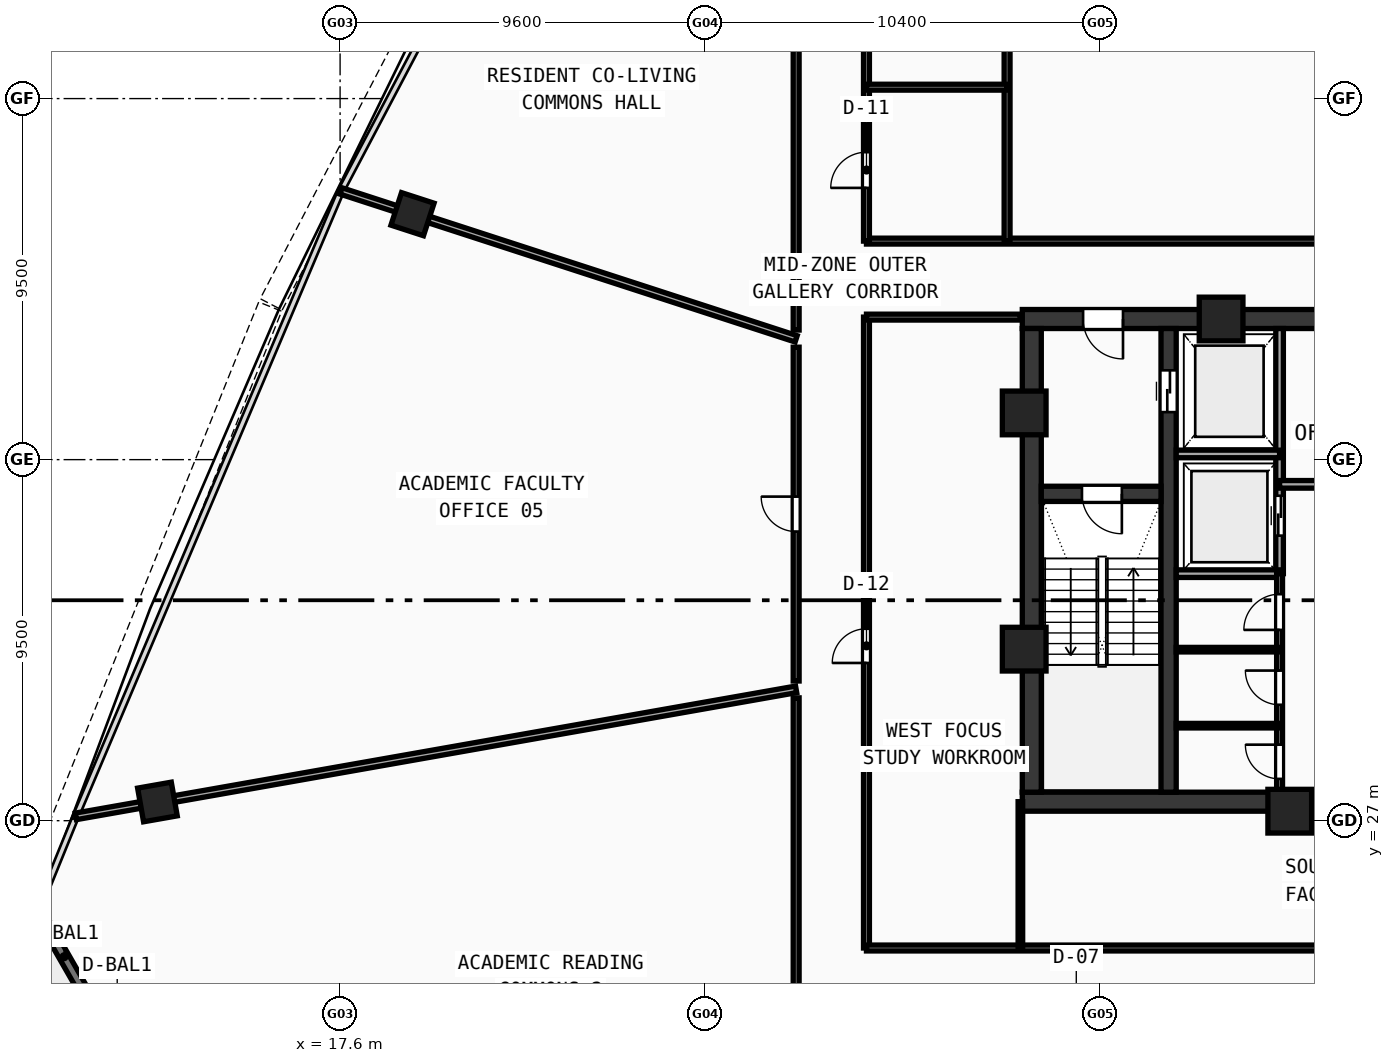
"""IFC4 building model, lengths in metres.
Left out: names, types, materials, properties, quantities, classifications, styles, units other than length and angle.
Written with IfcOpenShell. Run it as: python <this file> out.ifc"""

import sys

from ifc_helpers import new_model, si_unit, direction, frame, frame_2d, origin, origin_with_axes, origin_2d, place, context, subcontext, project, spatial, rectangle, hollow_rectangle, extrude, source, transform, mapped, element, fill, save


model = new_model("IFC4")
c1 = context("Model", 3, precision=1e-05, world=origin(), true_north=direction((0.0, 1.0)))
c2 = subcontext(c1, "Body", "Model", "MODEL_VIEW")
j1 = project(units=[si_unit("LENGTHUNIT", "METRE"), si_unit("PLANEANGLEUNIT", "RADIAN")], contexts=[c1])
p1 = place(None, origin())
s1 = spatial("IfcSite", under=j1, at=p1, CompositionType="ELEMENT")
p2 = place(p1, origin())
s2 = spatial("IfcBuilding", under=s1, at=p2, CompositionType="ELEMENT")
p3 = place(p2, frame((0.0, 0.0, 196.16)))
s3 = spatial("IfcBuildingStorey", under=s2, at=p3, CompositionType="ELEMENT", Elevation=196.16)
p4 = place(p3, frame((35.55, 27.5, 0.0), z_axis=(0.0, 0.0, 1.0), x_axis=(1.0, 0.0, 0.0)))
e1 = element("IfcWall", 1, at=p4, inside=s3, PredefinedType="SHEAR", context=c2, shape_type="SweptSolid", body=[
    extrude(rectangle(XDim=24.9, YDim=0.5, at=frame_2d((12.45, 0.0))), origin(), (0.0, 0.0, 1.0), 3.54),
])
p5 = place(p3, frame((35.55, 40.2, 0.0), z_axis=(0.0, 0.0, 1.0), x_axis=(1.0, 0.0, 0.0)))
e2 = element("IfcWall", 2, at=p5, inside=s3, PredefinedType="SHEAR", context=c2, shape_type="SweptSolid", body=[
    extrude(rectangle(XDim=11.25, YDim=0.5, at=frame_2d((5.625, 0.0))), origin(), (0.0, 0.0, 1.0), 3.54),
])
p6 = place(p5, frame((1.6, 0.0, 0.0)))
e3 = element("IfcOpeningElement", 3, at=p6, cuts=e2, PredefinedType="OPENING", context=c2, shape_type="SweptSolid", body=[
    extrude(rectangle(XDim=1.05, YDim=2.1, at=frame_2d((0.525, 1.05))), frame((0.0, 0.26, 0.0), z_axis=(0.0, -1.0, 0.0), x_axis=(1.0, 0.0, 0.0)), (0.0, 0.0, 1.0), 0.52),
])
p7 = place(p3, frame((35.8, 27.75, 0.0), z_axis=(0.0, 0.0, 1.0), x_axis=(0.0, 1.0, 0.0)))
e4 = element("IfcWall", 4, at=p7, inside=s3, PredefinedType="SHEAR", context=c2, shape_type="SweptSolid", body=[
    extrude(rectangle(XDim=12.2, YDim=0.5, at=frame_2d((6.1, 0.0))), origin(), (0.0, 0.0, 1.0), 3.54),
])
p8 = place(p3, frame((39.4, 27.75, 0.0), z_axis=(0.0, 0.0, 1.0), x_axis=(0.0, 1.0, 0.0)))
e5 = element("IfcWall", 5, at=p8, inside=s3, PredefinedType="SHEAR", context=c2, shape_type="SweptSolid", body=[
    extrude(rectangle(XDim=12.2, YDim=0.4, at=frame_2d((6.1, 0.0))), origin(), (0.0, 0.0, 1.0), 3.54),
])
p9 = place(p8, frame((10.0, 0.0, 0.0)))
e6 = element("IfcOpeningElement", 6, at=p9, cuts=e5, PredefinedType="OPENING", context=c2, shape_type="SweptSolid", body=[
    extrude(rectangle(XDim=1.1, YDim=2.1, at=frame_2d((0.55, 1.05))), frame((0.0, 0.21, 0.0), z_axis=(0.0, -1.0, 0.0), x_axis=(1.0, 0.0, 0.0)), (0.0, 0.0, 1.0), 0.42),
])
p10 = place(p3, frame((36.05, 35.6, 0.0), z_axis=(0.0, 0.0, 1.0), x_axis=(1.0, 0.0, 0.0)))
e7 = element("IfcWall", 7, at=p10, inside=s3, PredefinedType="SHEAR", context=c2, shape_type="SweptSolid", body=[
    extrude(rectangle(XDim=3.15, YDim=0.4, at=frame_2d((1.575, 0.0))), origin(), (0.0, 0.0, 1.0), 3.54),
])
p11 = place(p10, frame((1.07, 0.0, 0.0)))
e8 = element("IfcOpeningElement", 8, at=p11, cuts=e7, PredefinedType="OPENING", context=c2, shape_type="SweptSolid", body=[
    extrude(rectangle(XDim=1.05, YDim=2.1, at=frame_2d((0.525, 1.05))), frame((0.0, 0.21, 0.0), z_axis=(0.0, -1.0, 0.0), x_axis=(1.0, 0.0, 0.0)), (0.0, 0.0, 1.0), 0.42),
])
m1 = source(origin(), c2, "Body", "SweptSolid", [
    extrude(hollow_rectangle(XDim=1.15, YDim=1.15, WallThickness=0.048, at=origin_2d()), origin(), (0.0, 0.0, 1.0), 3.8),
])
for number, where, z_axis, x_axis in (
    (9, (42.588, 27.25, -0.26), (0.0, 0.0, 1.0), (1.0, 0.0, 0.0)),
    (10, (40.781, 40.2, -0.26), (0.0, 0.0, 1.0), (1.0, 0.0, 0.0)),
    (11, (35.6, 37.729, -0.26), (0.0, 0.0, 1.0), (1.0, 0.0, 0.0)),
    (12, (35.6, 31.513, -0.26), (0.0, 0.0, 1.0), (1.0, 0.0, 0.0)),
):
    element("IfcColumn", number, at=place(p3, frame(where, z_axis=z_axis, x_axis=x_axis)), inside=s3, PredefinedType="COLUMN", context=c2, shape_type="MappedRepresentation", body=[
        mapped(m1, transform((0.0, 0.0, 0.0), scale=1.0)),
    ])
m2 = source(origin(), c2, "Body", "SweptSolid", [
    extrude(hollow_rectangle(XDim=0.9, YDim=0.9, WallThickness=0.036, at=origin_2d()), origin(), (0.0, 0.0, 1.0), 3.8),
])
for number, where, z_axis, x_axis in (
    (13, (19.505, 42.958, -0.26), (0.0, 0.0, 1.0), (-0.309, -0.951, 0.0)),
    (14, (12.793, 27.492, -0.26), (0.0, 0.0, 1.0), (0.174, -0.985, 0.0)),
):
    element("IfcColumn", number, at=place(p3, frame(where, z_axis=z_axis, x_axis=x_axis)), inside=s3, PredefinedType="COLUMN", context=c2, shape_type="MappedRepresentation", body=[
        mapped(m2, transform((0.0, 0.0, 0.0), scale=1.0)),
    ])
p12 = place(p3, frame((9.611, 24.686, 0.0), z_axis=(0.0, 0.0, 1.0), x_axis=(0.497930869929, -0.867216725376, 0.0)))
e15 = element("IfcWall", 15, at=p12, inside=s3, PredefinedType="STANDARD", context=c2, shape_type="SweptSolid", body=[
    extrude(rectangle(XDim=8.534, YDim=0.26, at=frame_2d((4.267, 0.0))), origin(), (0.0, 0.0, 1.0), 3.54),
])
p13 = place(p12, frame((3.367, 0.0, 0.0)))
e16 = element("IfcOpeningElement", 16, at=p13, cuts=e15, PredefinedType="OPENING", context=c2, shape_type="SweptSolid", body=[
    extrude(rectangle(XDim=1.8, YDim=2.15, at=frame_2d((0.9, 1.075))), frame((0.0, 0.14, 0.0), z_axis=(0.0, -1.0, 0.0), x_axis=(1.0, 0.0, 0.0)), (0.0, 0.0, 1.0), 0.28),
])
p14 = place(p3, frame((42.32, 33.5, 0.0), z_axis=(0.0, 0.0, 1.0), x_axis=(0.0, 1.0, 0.0)))
e17 = element("IfcWall", 17, at=p14, inside=s3, PredefinedType="SOLIDWALL", context=c2, shape_type="SweptSolid", body=[
    extrude(rectangle(XDim=6.45, YDim=0.2, at=frame_2d((3.225, 0.0))), origin(), (0.0, 0.0, 1.0), 3.54),
])
p15 = place(p14, frame((1.0, 0.0, 0.0)))
e18 = element("IfcOpeningElement", 18, at=p15, cuts=e17, PredefinedType="OPENING", context=c2, shape_type="SweptSolid", body=[
    extrude(rectangle(XDim=1.05, YDim=2.1, at=frame_2d((0.525, 1.05))), frame((0.0, 0.11, 0.0), z_axis=(0.0, -1.0, 0.0), x_axis=(1.0, 0.0, 0.0)), (0.0, 0.0, 1.0), 0.22),
])
for number, where, z_axis, x_axis in (
    (19, (39.6, 36.65, 0.0), (0.0, 0.0, 1.0), (1.0, 0.0, 0.0)),
    (20, (39.6, 33.5, 0.0), (0.0, 0.0, 1.0), (1.0, 0.0, 0.0)),
):
    element("IfcWall", number, at=place(p3, frame(where, z_axis=z_axis, x_axis=x_axis)), inside=s3, PredefinedType="SOLIDWALL", context=c2, shape_type="SweptSolid", body=[
        extrude(rectangle(XDim=2.72, YDim=0.2, at=frame_2d((1.36, 0.0))), origin(), (0.0, 0.0, 1.0), 3.54),
    ])
p16 = place(p3, frame((42.32, 35.85, 0.0), z_axis=(0.0, 0.0, 1.0), x_axis=(1.0, 0.0, 0.0)))
e21 = element("IfcWall", 21, at=p16, inside=s3, PredefinedType="SOLIDWALL", context=c2, shape_type="SweptSolid", body=[
    extrude(rectangle(XDim=4.73, YDim=0.2, at=frame_2d((2.365, 0.0))), origin(), (0.0, 0.0, 1.0), 3.54),
])
p17 = place(p16, frame((1.8, 0.0, 0.0)))
e22 = element("IfcOpeningElement", 22, at=p17, cuts=e21, PredefinedType="OPENING", context=c2, shape_type="SweptSolid", body=[
    extrude(rectangle(XDim=0.9, YDim=2.1, at=frame_2d((0.45, 1.05))), frame((0.0, 0.11, 0.0), z_axis=(0.0, -1.0, 0.0), x_axis=(1.0, 0.0, 0.0)), (0.0, 0.0, 1.0), 0.22),
])
p18 = place(p3, frame((42.32, 27.6, 0.0), z_axis=(0.0, 0.0, 1.0), x_axis=(0.0, 1.0, 0.0)))
e23 = element("IfcWall", 23, at=p18, inside=s3, PredefinedType="PARTITIONING", context=c2, shape_type="SweptSolid", body=[
    extrude(rectangle(XDim=5.9, YDim=0.155, at=frame_2d((2.95, 0.0))), origin(), (0.0, 0.0, 1.0), 3.54),
])
p19 = place(p18, frame((0.5, 0.0, 0.0)))
e24 = element("IfcOpeningElement", 24, at=p19, cuts=e23, PredefinedType="OPENING", context=c2, shape_type="SweptSolid", body=[
    extrude(rectangle(XDim=0.9, YDim=2.1, at=frame_2d((0.45, 1.05))), frame((0.0, 0.087, 0.0), z_axis=(0.0, -1.0, 0.0), x_axis=(1.0, 0.0, 0.0)), (0.0, 0.0, 1.0), 0.175),
])
p20 = place(p18, frame((2.45, 0.0, 0.0)))
e25 = element("IfcOpeningElement", 25, at=p20, cuts=e23, PredefinedType="OPENING", context=c2, shape_type="SweptSolid", body=[
    extrude(rectangle(XDim=0.9, YDim=2.1, at=frame_2d((0.45, 1.05))), frame((0.0, 0.087, 0.0), z_axis=(0.0, -1.0, 0.0), x_axis=(1.0, 0.0, 0.0)), (0.0, 0.0, 1.0), 0.175),
])
p21 = place(p18, frame((4.42, 0.0, 0.0)))
e26 = element("IfcOpeningElement", 26, at=p21, cuts=e23, PredefinedType="OPENING", context=c2, shape_type="SweptSolid", body=[
    extrude(rectangle(XDim=0.94, YDim=2.1, at=frame_2d((0.47, 1.05))), frame((0.0, 0.087, 0.0), z_axis=(0.0, -1.0, 0.0), x_axis=(1.0, 0.0, 0.0)), (0.0, 0.0, 1.0), 0.175),
])
for number, where, z_axis, x_axis in (
    (27, (39.6, 29.5, 0.0), (0.0, 0.0, 1.0), (1.0, 0.0, 0.0)),
    (28, (39.6, 31.5, 0.0), (0.0, 0.0, 1.0), (1.0, 0.0, 0.0)),
):
    element("IfcWall", number, at=place(p3, frame(where, z_axis=z_axis, x_axis=x_axis)), inside=s3, PredefinedType="PARTITIONING", context=c2, shape_type="SweptSolid", body=[
        extrude(rectangle(XDim=2.72, YDim=0.12, at=frame_2d((1.36, 0.0))), origin(), (0.0, 0.0, 1.0), 3.54),
    ])
p22 = place(p3, frame((31.45, 42.25, 0.0), z_axis=(0.0, 0.0, 1.0), x_axis=(1.0, 0.0, 0.0)))
e29 = element("IfcWall", 29, at=p22, inside=s3, PredefinedType="PARTITIONING", context=c2, shape_type="SweptSolid", body=[
    extrude(rectangle(XDim=33.1, YDim=0.155, at=frame_2d((16.55, 0.0))), origin(), (0.0, 0.0, 1.0), 2.89),
])
p23 = place(p3, frame((31.45, 42.25, 0.0), z_axis=(0.0, 0.0, 1.0), x_axis=(0.0, 1.0, 0.0)))
e30 = element("IfcWall", 30, at=p23, inside=s3, PredefinedType="PARTITIONING", context=c2, shape_type="SweptSolid", body=[
    extrude(rectangle(XDim=11.7, YDim=0.155, at=frame_2d((5.85, 0.0))), origin(), (0.0, 0.0, 1.0), 2.89),
])
p24 = place(p23, frame((1.4, 0.0, 0.0)))
e31 = element("IfcOpeningElement", 31, at=p24, cuts=e30, PredefinedType="OPENING", context=c2, shape_type="SweptSolid", body=[
    extrude(rectangle(XDim=0.94, YDim=2.1, at=frame_2d((0.47, 1.05))), frame((0.0, 0.087, 0.0), z_axis=(0.0, -1.0, 0.0), x_axis=(1.0, 0.0, 0.0)), (0.0, 0.0, 1.0), 0.175),
])
p25 = place(p23, frame((6.8, 0.0, 0.0)))
e32 = element("IfcOpeningElement", 32, at=p25, cuts=e30, PredefinedType="OPENING", context=c2, shape_type="SweptSolid", body=[
    extrude(rectangle(XDim=0.92, YDim=2.1, at=frame_2d((0.46, 1.05))), frame((0.0, 0.087, 0.0), z_axis=(0.0, -1.0, 0.0), x_axis=(1.0, 0.0, 0.0)), (0.0, 0.0, 1.0), 0.175),
])
p26 = place(p3, frame((35.15, 42.25, 0.0), z_axis=(0.0, 0.0, 1.0), x_axis=(0.0, 1.0, 0.0)))
e33 = element("IfcWall", 33, at=p26, inside=s3, PredefinedType="PARTITIONING", context=c2, shape_type="SweptSolid", body=[
    extrude(rectangle(XDim=11.7, YDim=0.155, at=frame_2d((5.85, 0.0))), origin(), (0.0, 0.0, 1.0), 2.89),
])
p27 = place(p3, frame((31.45, 46.3, 0.0), z_axis=(0.0, 0.0, 1.0), x_axis=(1.0, 0.0, 0.0)))
e34 = element("IfcWall", 34, at=p27, inside=s3, PredefinedType="PARTITIONING", context=c2, shape_type="SweptSolid", body=[
    extrude(rectangle(XDim=3.7, YDim=0.155, at=frame_2d((1.85, 0.0))), origin(), (0.0, 0.0, 1.0), 2.89),
])
p28 = place(p3, frame((31.45, 23.65, 0.0), z_axis=(0.0, 0.0, 1.0), x_axis=(0.0, 1.0, 0.0)))
e35 = element("IfcWall", 35, at=p28, inside=s3, PredefinedType="PARTITIONING", context=c2, shape_type="SweptSolid", body=[
    extrude(rectangle(XDim=16.6, YDim=0.155, at=frame_2d((8.3, 0.0))), origin(), (0.0, 0.0, 1.0), 2.89),
])
p29 = place(p28, frame((7.5, 0.0, 0.0)))
e36 = element("IfcOpeningElement", 36, at=p29, cuts=e35, PredefinedType="OPENING", context=c2, shape_type="SweptSolid", body=[
    extrude(rectangle(XDim=0.9, YDim=2.08, at=frame_2d((0.45, 1.04))), frame((0.0, 0.087, 0.0), z_axis=(0.0, -1.0, 0.0), x_axis=(1.0, 0.0, 0.0)), (0.0, 0.0, 1.0), 0.175),
])
p30 = place(p3, frame((31.45, 23.65, 0.0), z_axis=(0.0, 0.0, 1.0), x_axis=(1.0, 0.0, 0.0)))
e37 = element("IfcWall", 37, at=p30, inside=s3, PredefinedType="PARTITIONING", context=c2, shape_type="SweptSolid", body=[
    extrude(rectangle(XDim=33.1, YDim=0.155, at=frame_2d((16.55, 0.0))), origin(), (0.0, 0.0, 1.0), 2.89),
])
p31 = place(p30, frame((16.0, 0.0, 0.0)))
e38 = element("IfcOpeningElement", 38, at=p31, cuts=e37, PredefinedType="OPENING", context=c2, shape_type="SweptSolid", body=[
    extrude(rectangle(XDim=0.92, YDim=2.1, at=frame_2d((0.46, 1.05))), frame((0.0, 0.087, 0.0), z_axis=(0.0, -1.0, 0.0), x_axis=(1.0, 0.0, 0.0)), (0.0, 0.0, 1.0), 0.175),
])
p32 = place(p3, frame((31.45, 40.25, 0.0), z_axis=(0.0, 0.0, 1.0), x_axis=(1.0, 0.0, 0.0)))
e39 = element("IfcWall", 39, at=p32, inside=s3, PredefinedType="PARTITIONING", context=c2, shape_type="SweptSolid", body=[
    extrude(rectangle(XDim=4.05, YDim=0.155, at=frame_2d((2.025, 0.0))), origin(), (0.0, 0.0, 1.0), 3.54),
])
p33 = place(p3, frame((35.5, 23.65, 0.0), z_axis=(0.0, 0.0, 1.0), x_axis=(0.0, 1.0, 0.0)))
e40 = element("IfcWall", 40, at=p33, inside=s3, PredefinedType="PARTITIONING", context=c2, shape_type="SweptSolid", body=[
    extrude(rectangle(XDim=3.85, YDim=0.12, at=frame_2d((1.925, 0.0))), origin(), (0.0, 0.0, 1.0), 3.14),
])
p34 = place(p3, frame((29.6, 39.678, 0.0), z_axis=(0.0, 0.0, 1.0), x_axis=(-0.951056149915, 0.309018121975, 0.0)))
e41 = element("IfcWall", 41, at=p34, inside=s3, PredefinedType="PARTITIONING", context=c2, shape_type="SweptSolid", body=[
    extrude(rectangle(XDim=12.593, YDim=0.175, at=frame_2d((6.296, 0.0))), origin(), (0.0, 0.0, 1.0), 2.89),
])
p35 = place(p3, frame((29.6, 30.456, 0.0), z_axis=(0.0, 0.0, 1.0), x_axis=(-0.984807685374, -0.173648561263, 0.0)))
e42 = element("IfcWall", 42, at=p35, inside=s3, PredefinedType="PARTITIONING", context=c2, shape_type="SweptSolid", body=[
    extrude(rectangle(XDim=19.246, YDim=0.175, at=frame_2d((9.623, 0.0))), origin(), (0.0, 0.0, 1.0), 2.89),
])
p36 = place(p3, frame((29.6, 21.8, 0.0), z_axis=(0.0, 0.0, 1.0), x_axis=(0.0, 1.0, 0.0)))
e43 = element("IfcWall", 43, at=p36, inside=s3, PredefinedType="PARTITIONING", context=c2, shape_type="SweptSolid", body=[
    extrude(rectangle(XDim=8.432, YDim=0.155, at=frame_2d((4.216, 0.0))), origin(), (0.0, 0.0, 1.0), 3.14),
])
p37 = place(p3, frame((29.6, 30.675, 0.0), z_axis=(0.0, 0.0, 1.0), x_axis=(0.0, 1.0, 0.0)))
e44 = element("IfcWall", 44, at=p37, inside=s3, PredefinedType="PARTITIONING", context=c2, shape_type="SweptSolid", body=[
    extrude(rectangle(XDim=8.783, YDim=0.155, at=frame_2d((4.392, 0.0))), origin(), (0.0, 0.0, 1.0), 3.14),
])
p38 = place(p37, frame((3.932, 0.0, 0.0)))
e45 = element("IfcOpeningElement", 45, at=p38, cuts=e44, PredefinedType="OPENING", context=c2, shape_type="SweptSolid", body=[
    extrude(rectangle(XDim=0.92, YDim=2.1, at=frame_2d((0.46, 1.05))), frame((0.0, 0.087, 0.0), z_axis=(0.0, -1.0, 0.0), x_axis=(1.0, 0.0, 0.0)), (0.0, 0.0, 1.0), 0.175),
])
p39 = place(p3, frame((29.6, 39.91, 0.0), z_axis=(0.0, 0.0, 1.0), x_axis=(0.0, 1.0, 0.0)))
e46 = element("IfcWall", 46, at=p39, inside=s3, PredefinedType="PARTITIONING", context=c2, shape_type="SweptSolid", body=[
    extrude(rectangle(XDim=15.89, YDim=0.155, at=frame_2d((7.945, 0.0))), origin(), (0.0, 0.0, 1.0), 2.89),
])
p40 = place(p39, frame((7.584, 0.0, 0.0)))
e47 = element("IfcOpeningElement", 47, at=p40, cuts=e46, PredefinedType="OPENING", context=c2, shape_type="SweptSolid", body=[
    extrude(rectangle(XDim=0.96, YDim=2.12, at=frame_2d((0.48, 1.06))), frame((0.0, 0.087, 0.0), z_axis=(0.0, -1.0, 0.0), x_axis=(1.0, 0.0, 0.0)), (0.0, 0.0, 1.0), 0.175),
])
m3 = source(origin(), c2, "Body", "SweptSolid", [
    extrude(rectangle(XDim=1.05, YDim=2.1, at=frame_2d((0.525, 1.05))), frame((0.0, 0.025, 0.0), z_axis=(0.0, -1.0, 0.0), x_axis=(1.0, 0.0, 0.0)), (0.0, 0.0, 1.0), 0.05),
])
p41 = place(p11, frame((1.05, 0.0, 0.0), z_axis=(0.0, 0.0, 1.0), x_axis=(-1.0, 0.0, 0.0)))
e48 = element("IfcDoor", 48, at=p41, inside=s3, OperationType="SINGLE_SWING_LEFT", PredefinedType="DOOR", context=c2, shape_type="MappedRepresentation", body=[
    mapped(m3, transform((0.0, 0.0, 0.0), scale=1.0)),
])
fill(e8, e48)
p42 = place(p6, frame((1.05, 0.0, 0.0), z_axis=(0.0, 0.0, 1.0), x_axis=(-1.0, 0.0, 0.0)))
e49 = element("IfcDoor", 49, at=p42, inside=s3, OperationType="SINGLE_SWING_LEFT", PredefinedType="DOOR", context=c2, shape_type="MappedRepresentation", body=[
    mapped(m3, transform((0.0, 0.0, 0.0), scale=1.0)),
])
fill(e3, e49)
m4 = source(origin(), c2, "Body", "SweptSolid", [
    extrude(rectangle(XDim=1.1, YDim=2.1, at=frame_2d((0.55, 1.05))), frame((0.0, 0.025, 0.0), z_axis=(0.0, -1.0, 0.0), x_axis=(1.0, 0.0, 0.0)), (0.0, 0.0, 1.0), 0.05),
])
p43 = place(p9, frame((1.1, 0.0, 0.0), z_axis=(0.0, 0.0, 1.0), x_axis=(-1.0, 0.0, 0.0)))
e50 = element("IfcDoor", 50, at=p43, inside=s3, OperationType="DOUBLE_DOOR_SLIDING", PredefinedType="DOOR", context=c2, shape_type="MappedRepresentation", body=[
    mapped(m4, transform((0.0, 0.0, 0.0), scale=1.0)),
])
fill(e6, e50)
p44 = place(p15, origin_with_axes())
e51 = element("IfcDoor", 51, at=p44, inside=s3, OperationType="DOUBLE_DOOR_SLIDING", PredefinedType="DOOR", context=c2, shape_type="MappedRepresentation", body=[
    mapped(m3, transform((0.0, 0.0, 0.0), scale=1.0)),
])
fill(e18, e51)
m5 = source(origin(), c2, "Body", "SweptSolid", [
    extrude(rectangle(XDim=0.9, YDim=2.1, at=frame_2d((0.45, 1.05))), frame((0.0, 0.025, 0.0), z_axis=(0.0, -1.0, 0.0), x_axis=(1.0, 0.0, 0.0)), (0.0, 0.0, 1.0), 0.05),
])
p45 = place(p19, origin_with_axes())
e52 = element("IfcDoor", 52, at=p45, inside=s3, OperationType="SINGLE_SWING_RIGHT", PredefinedType="DOOR", context=c2, shape_type="MappedRepresentation", body=[
    mapped(m5, transform((0.0, 0.0, 0.0), scale=1.0)),
])
fill(e24, e52)
p46 = place(p20, origin_with_axes())
e53 = element("IfcDoor", 53, at=p46, inside=s3, OperationType="SINGLE_SWING_RIGHT", PredefinedType="DOOR", context=c2, shape_type="MappedRepresentation", body=[
    mapped(m5, transform((0.0, 0.0, 0.0), scale=1.0)),
])
fill(e25, e53)
m6 = source(origin(), c2, "Body", "SweptSolid", [
    extrude(rectangle(XDim=0.94, YDim=2.1, at=frame_2d((0.47, 1.05))), frame((0.0, 0.025, 0.0), z_axis=(0.0, -1.0, 0.0), x_axis=(1.0, 0.0, 0.0)), (0.0, 0.0, 1.0), 0.05),
])
p47 = place(p21, origin_with_axes())
e54 = element("IfcDoor", 54, at=p47, inside=s3, OperationType="SINGLE_SWING_LEFT", PredefinedType="DOOR", context=c2, shape_type="MappedRepresentation", body=[
    mapped(m6, transform((0.0, 0.0, 0.0), scale=1.0)),
])
fill(e26, e54)
p48 = place(p24, origin_with_axes())
e55 = element("IfcDoor", 55, at=p48, inside=s3, OperationType="SINGLE_SWING_LEFT", PredefinedType="DOOR", context=c2, shape_type="MappedRepresentation", body=[
    mapped(m6, transform((0.0, 0.0, 0.0), scale=1.0)),
])
fill(e31, e55)
m7 = source(origin(), c2, "Body", "SweptSolid", [
    extrude(rectangle(XDim=0.9, YDim=2.08, at=frame_2d((0.45, 1.04))), frame((0.0, 0.025, 0.0), z_axis=(0.0, -1.0, 0.0), x_axis=(1.0, 0.0, 0.0)), (0.0, 0.0, 1.0), 0.05),
])
p49 = place(p29, origin_with_axes())
e56 = element("IfcDoor", 56, at=p49, inside=s3, OperationType="SINGLE_SWING_LEFT", PredefinedType="DOOR", context=c2, shape_type="MappedRepresentation", body=[
    mapped(m7, transform((0.0, 0.0, 0.0), scale=1.0)),
])
fill(e36, e56)
m8 = source(origin(), c2, "Body", "SweptSolid", [
    extrude(rectangle(XDim=0.92, YDim=2.1, at=frame_2d((0.46, 1.05))), frame((0.0, 0.025, 0.0), z_axis=(0.0, -1.0, 0.0), x_axis=(1.0, 0.0, 0.0)), (0.0, 0.0, 1.0), 0.05),
])
p50 = place(p38, origin_with_axes())
e57 = element("IfcDoor", 57, at=p50, inside=s3, OperationType="SINGLE_SWING_RIGHT", PredefinedType="DOOR", context=c2, shape_type="MappedRepresentation", body=[
    mapped(m8, transform((0.0, 0.0, 0.0), scale=1.0)),
])
fill(e45, e57)
save(model, sys.argv[1])
